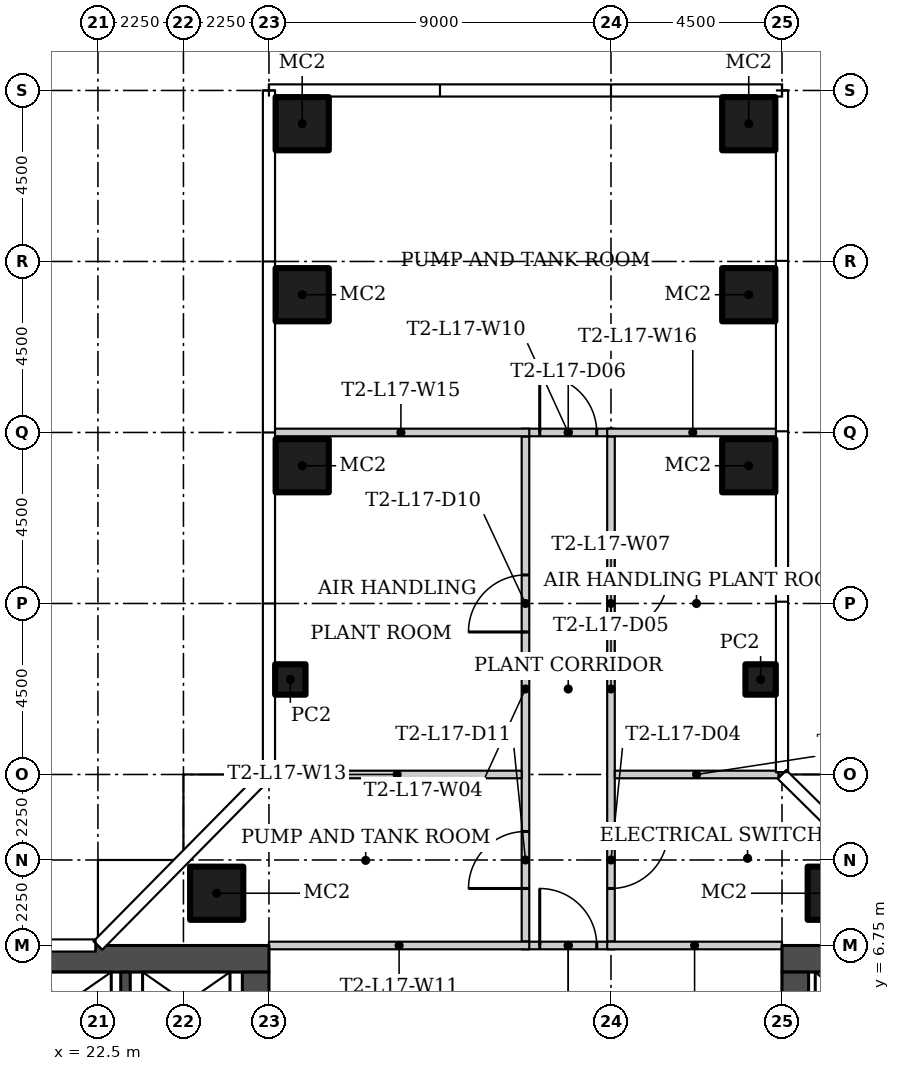
"""IFC4 building model, lengths in metres.
Left out: names, types, materials, properties, quantities, classifications, styles, units other than length and angle.
Written with IfcOpenShell. Run it as: python <this file> out.ifc"""

import sys

from ifc_helpers import new_model, si_unit, direction, frame, frame_2d, origin, origin_2d, place, context, subcontext, project, spatial, rectangle, hollow_rectangle, extrude, element, fill, save


model = new_model("IFC4")
c1 = context("Model", 3, precision=1e-05, world=origin(), true_north=direction((0.0, 1.0)))
c2 = subcontext(c1, "Body", "Model", "MODEL_VIEW")
j1 = project(units=[si_unit("LENGTHUNIT", "METRE"), si_unit("PLANEANGLEUNIT", "RADIAN")], contexts=[c1])
p1 = place(None, origin())
s1 = spatial("IfcSite", under=j1, at=p1, CompositionType="ELEMENT")
p2 = place(p1, origin())
s2 = spatial("IfcBuilding", under=s1, at=p2, CompositionType="ELEMENT")
p3 = place(p2, frame((0.0, 0.0, 77.1)))
s3 = spatial("IfcBuildingStorey", under=s2, at=p3, CompositionType="ELEMENT", Elevation=77.1)
for number, where in (
    (1, (25.625, 8.125, 0.0)),
    (2, (41.875, 8.125, 0.0)),
):
    element("IfcColumn", number, at=place(p3, frame(where)), inside=s3, PredefinedType="COLUMN", context=c2, shape_type="SweptSolid", body=[
        extrude(hollow_rectangle(XDim=1.4, YDim=1.4, WallThickness=0.05, at=origin_2d()), origin(), (0.0, 0.0, 1.0), 4.45),
    ])
p4 = place(p3, frame((39.938, 13.75, 0.0)))
e3 = element("IfcColumn", 3, at=p4, inside=s3, PredefinedType="COLUMN", context=c2, shape_type="SweptSolid", body=[
    extrude(hollow_rectangle(XDim=0.8, YDim=0.8, WallThickness=0.025, at=origin_2d()), origin(), (0.0, 0.0, 1.0), 4.45),
])
for number, where in (
    (4, (39.625, 19.375, 0.0)),
    (5, (39.625, 23.875, 0.0)),
    (6, (39.625, 28.375, 0.0)),
):
    element("IfcColumn", number, at=place(p3, frame(where)), inside=s3, PredefinedType="COLUMN", context=c2, shape_type="SweptSolid", body=[
        extrude(hollow_rectangle(XDim=1.4, YDim=1.4, WallThickness=0.05, at=origin_2d()), origin(), (0.0, 0.0, 1.0), 4.45),
    ])
p5 = place(p3, frame((27.562, 13.75, 0.0)))
e7 = element("IfcColumn", 7, at=p5, inside=s3, PredefinedType="COLUMN", context=c2, shape_type="SweptSolid", body=[
    extrude(hollow_rectangle(XDim=0.8, YDim=0.8, WallThickness=0.025, at=origin_2d()), origin(), (0.0, 0.0, 1.0), 4.45),
])
for number, where in (
    (8, (27.875, 19.375, 0.0)),
    (9, (27.875, 23.875, 0.0)),
    (10, (27.875, 28.375, 0.0)),
):
    element("IfcColumn", number, at=place(p3, frame(where)), inside=s3, PredefinedType="COLUMN", context=c2, shape_type="SweptSolid", body=[
        extrude(hollow_rectangle(XDim=1.4, YDim=1.4, WallThickness=0.05, at=origin_2d()), origin(), (0.0, 0.0, 1.0), 4.45),
    ])
p6 = place(p3, frame((33.75, 6.85, 0.0), z_axis=(0.0, 0.0, 1.0), x_axis=(0.0, 1.0, 0.0)))
e11 = element("IfcWall", 11, at=p6, inside=s3, PredefinedType="PARTITIONING", context=c2, shape_type="SweptSolid", body=[
    extrude(rectangle(XDim=13.3, YDim=0.2, at=frame_2d((6.65, 0.0))), origin(), (0.0, 0.0, 1.0), 4.45),
])
p7 = place(p6, frame((8.15, 0.0, 0.0)))
e12 = element("IfcOpeningElement", 12, at=p7, cuts=e11, PredefinedType="OPENING", context=c2, shape_type="SweptSolid", body=[
    extrude(rectangle(XDim=1.5, YDim=2.4, at=frame_2d((0.75, 1.2))), frame((0.0, 0.11, 0.0), z_axis=(0.0, -1.0, 0.0), x_axis=(1.0, 0.0, 0.0)), (0.0, 0.0, 1.0), 0.22),
])
p8 = place(p6, frame((1.4, 0.0, 0.0)))
e13 = element("IfcOpeningElement", 13, at=p8, cuts=e11, PredefinedType="OPENING", context=c2, shape_type="SweptSolid", body=[
    extrude(rectangle(XDim=1.5, YDim=2.4, at=frame_2d((0.75, 1.2))), frame((0.0, 0.11, 0.0), z_axis=(0.0, -1.0, 0.0), x_axis=(1.0, 0.0, 0.0)), (0.0, 0.0, 1.0), 0.22),
])
p9 = place(p3, frame((36.0, 20.15, 0.0), z_axis=(0.0, 0.0, 1.0), x_axis=(0.0, -1.0, 0.0)))
e14 = element("IfcWall", 14, at=p9, inside=s3, PredefinedType="PARTITIONING", context=c2, shape_type="SweptSolid", body=[
    extrude(rectangle(XDim=13.3, YDim=0.2, at=frame_2d((6.65, 0.0))), origin(), (0.0, 0.0, 1.0), 4.45),
])
p10 = place(p9, frame((10.4, 0.0, 0.0)))
e15 = element("IfcOpeningElement", 15, at=p10, cuts=e14, PredefinedType="OPENING", context=c2, shape_type="SweptSolid", body=[
    extrude(rectangle(XDim=1.5, YDim=2.4, at=frame_2d((0.75, 1.2))), frame((0.0, 0.11, 0.0), z_axis=(0.0, -1.0, 0.0), x_axis=(1.0, 0.0, 0.0)), (0.0, 0.0, 1.0), 0.22),
])
p11 = place(p9, frame((3.65, 0.0, 0.0)))
e16 = element("IfcOpeningElement", 16, at=p11, cuts=e14, PredefinedType="OPENING", context=c2, shape_type="SweptSolid", body=[
    extrude(rectangle(XDim=1.5, YDim=2.4, at=frame_2d((0.75, 1.2))), frame((0.0, 0.11, 0.0), z_axis=(0.0, -1.0, 0.0), x_axis=(1.0, 0.0, 0.0)), (0.0, 0.0, 1.0), 0.22),
])
p12 = place(p3, frame((33.65, 6.75, 0.0)))
e17 = element("IfcWall", 17, at=p12, inside=s3, PredefinedType="PARTITIONING", context=c2, shape_type="SweptSolid", body=[
    extrude(rectangle(XDim=2.45, YDim=0.2, at=frame_2d((1.225, 0.0))), origin(), (0.0, 0.0, 1.0), 4.45),
])
p13 = place(p12, frame((0.475, 0.0, 0.0)))
e18 = element("IfcOpeningElement", 18, at=p13, cuts=e17, PredefinedType="OPENING", context=c2, shape_type="SweptSolid", body=[
    extrude(rectangle(XDim=1.5, YDim=2.4, at=frame_2d((0.75, 1.2))), frame((0.0, 0.11, 0.0), z_axis=(0.0, -1.0, 0.0), x_axis=(1.0, 0.0, 0.0)), (0.0, 0.0, 1.0), 0.22),
])
p14 = place(p3, frame((33.65, 20.25, 0.0)))
e19 = element("IfcWall", 19, at=p14, inside=s3, PredefinedType="PARTITIONING", context=c2, shape_type="SweptSolid", body=[
    extrude(rectangle(XDim=2.45, YDim=0.2, at=frame_2d((1.225, 0.0))), origin(), (0.0, 0.0, 1.0), 4.45),
])
p15 = place(p14, frame((0.475, 0.0, 0.0)))
e20 = element("IfcOpeningElement", 20, at=p15, cuts=e19, PredefinedType="OPENING", context=c2, shape_type="SweptSolid", body=[
    extrude(rectangle(XDim=1.5, YDim=2.4, at=frame_2d((0.75, 1.2))), frame((0.0, 0.11, 0.0), z_axis=(0.0, -1.0, 0.0), x_axis=(1.0, 0.0, 0.0)), (0.0, 0.0, 1.0), 0.22),
])
p16 = place(p3, frame((33.85, 6.75, 0.0), z_axis=(0.0, 0.0, 1.0), x_axis=(-1.0, 0.0, 0.0)))
e21 = element("IfcWall", 21, at=p16, inside=s3, PredefinedType="PARTITIONING", context=c2, shape_type="SweptSolid", body=[
    extrude(rectangle(XDim=6.85, YDim=0.2, at=frame_2d((3.425, 0.0))), origin(), (0.0, 0.0, 1.0), 4.45),
])
p17 = place(p3, frame((40.5, 6.75, 0.0), z_axis=(0.0, 0.0, 1.0), x_axis=(-1.0, 0.0, 0.0)))
e22 = element("IfcWall", 22, at=p17, inside=s3, PredefinedType="PARTITIONING", context=c2, shape_type="SweptSolid", body=[
    extrude(rectangle(XDim=4.6, YDim=0.2, at=frame_2d((2.3, 0.0))), origin(), (0.0, 0.0, 1.0), 4.45),
])
p18 = place(p3, frame((33.65, 11.25, 0.0), z_axis=(0.0, 0.0, 1.0), x_axis=(-1.0, 0.0, 0.0)))
e23 = element("IfcWall", 23, at=p18, inside=s3, PredefinedType="PARTITIONING", context=c2, shape_type="SweptSolid", body=[
    extrude(rectangle(XDim=6.555, YDim=0.2, at=frame_2d((3.277, 0.0))), origin(), (0.0, 0.0, 1.0), 4.45),
])
p19 = place(p3, frame((40.405, 11.25, 0.0), z_axis=(0.0, 0.0, 1.0), x_axis=(-1.0, 0.0, 0.0)))
e24 = element("IfcWall", 24, at=p19, inside=s3, PredefinedType="PARTITIONING", context=c2, shape_type="SweptSolid", body=[
    extrude(rectangle(XDim=4.305, YDim=0.2, at=frame_2d((2.152, 0.0))), origin(), (0.0, 0.0, 1.0), 4.45),
])
p20 = place(p3, frame((33.85, 20.25, 0.0), z_axis=(0.0, 0.0, 1.0), x_axis=(-1.0, 0.0, 0.0)))
e25 = element("IfcWall", 25, at=p20, inside=s3, PredefinedType="PARTITIONING", context=c2, shape_type="SweptSolid", body=[
    extrude(rectangle(XDim=6.755, YDim=0.2, at=frame_2d((3.377, 0.0))), origin(), (0.0, 0.0, 1.0), 4.45),
])
p21 = place(p3, frame((40.405, 20.25, 0.0), z_axis=(0.0, 0.0, 1.0), x_axis=(-1.0, 0.0, 0.0)))
e26 = element("IfcWall", 26, at=p21, inside=s3, PredefinedType="PARTITIONING", context=c2, shape_type="SweptSolid", body=[
    extrude(rectangle(XDim=4.505, YDim=0.2, at=frame_2d((2.252, 0.0))), origin(), (0.0, 0.0, 1.0), 4.45),
])
p22 = place(p3, frame((13.5, 6.4, 0.0)))
e27 = element("IfcWall", 27, at=p22, inside=s3, PredefinedType="SHEAR", context=c2, shape_type="SweptSolid", body=[
    extrude(rectangle(XDim=13.5, YDim=0.7, at=frame_2d((6.75, 0.0))), origin(), (0.0, 0.0, 1.0), 4.45),
])
p23 = place(p3, frame((26.65, 6.05, 0.0), z_axis=(0.0, 0.0, 1.0), x_axis=(0.0, -1.0, 0.0)))
e28 = element("IfcWall", 28, at=p23, inside=s3, PredefinedType="SHEAR", context=c2, shape_type="SweptSolid", body=[
    extrude(rectangle(XDim=12.1, YDim=0.7, at=frame_2d((6.05, 0.0))), origin(), (0.0, 0.0, 1.0), 4.45),
])
p24 = place(p23, frame((10.1, 0.0, 0.0)))
e29 = element("IfcOpeningElement", 29, at=p24, cuts=e28, PredefinedType="OPENING", context=c2, shape_type="SweptSolid", body=[
    extrude(rectangle(XDim=1.2, YDim=2.1, at=frame_2d((0.6, 1.05))), frame((0.0, 0.36, 0.0), z_axis=(0.0, -1.0, 0.0), x_axis=(1.0, 0.0, 0.0)), (0.0, 0.0, 1.0), 0.72),
])
p25 = place(p23, frame((3.9, 0.0, 0.0)))
e30 = element("IfcOpeningElement", 30, at=p25, cuts=e28, PredefinedType="OPENING", context=c2, shape_type="SweptSolid", body=[
    extrude(rectangle(XDim=1.8, YDim=2.4, at=frame_2d((0.9, 1.2))), frame((0.0, 0.36, 0.0), z_axis=(0.0, -1.0, 0.0), x_axis=(1.0, 0.0, 0.0)), (0.0, 0.0, 1.0), 0.72),
])
p26 = place(p3, frame((23.225, 3.25, 0.0), z_axis=(0.0, 0.0, 1.0), x_axis=(0.0, 1.0, 0.0)))
e31 = element("IfcWall", 31, at=p26, inside=s3, PredefinedType="SHEAR", context=c2, shape_type="SweptSolid", body=[
    extrude(rectangle(XDim=2.8, YDim=0.25, at=frame_2d((1.4, 0.0))), origin(), (0.0, 0.0, 1.0), 4.45),
])
p27 = place(p3, frame((54.0, 6.4, 0.0), z_axis=(0.0, 0.0, 1.0), x_axis=(-1.0, 0.0, 0.0)))
e32 = element("IfcWall", 32, at=p27, inside=s3, PredefinedType="SHEAR", context=c2, shape_type="SweptSolid", body=[
    extrude(rectangle(XDim=13.5, YDim=0.7, at=frame_2d((6.75, 0.0))), origin(), (0.0, 0.0, 1.0), 4.45),
])
p28 = place(p3, frame((40.85, -6.05, 0.0), z_axis=(0.0, 0.0, 1.0), x_axis=(0.0, 1.0, 0.0)))
e33 = element("IfcWall", 33, at=p28, inside=s3, PredefinedType="SHEAR", context=c2, shape_type="SweptSolid", body=[
    extrude(rectangle(XDim=12.1, YDim=0.7, at=frame_2d((6.05, 0.0))), origin(), (0.0, 0.0, 1.0), 4.45),
])
p29 = place(p28, frame((0.8, 0.0, 0.0)))
e34 = element("IfcOpeningElement", 34, at=p29, cuts=e33, PredefinedType="OPENING", context=c2, shape_type="SweptSolid", body=[
    extrude(rectangle(XDim=1.2, YDim=2.1, at=frame_2d((0.6, 1.05))), frame((0.0, 0.36, 0.0), z_axis=(0.0, -1.0, 0.0), x_axis=(1.0, 0.0, 0.0)), (0.0, 0.0, 1.0), 0.72),
])
p30 = place(p28, frame((6.4, 0.0, 0.0)))
e35 = element("IfcOpeningElement", 35, at=p30, cuts=e33, PredefinedType="OPENING", context=c2, shape_type="SweptSolid", body=[
    extrude(rectangle(XDim=1.8, YDim=2.4, at=frame_2d((0.9, 1.2))), frame((0.0, 0.36, 0.0), z_axis=(0.0, -1.0, 0.0), x_axis=(1.0, 0.0, 0.0)), (0.0, 0.0, 1.0), 0.72),
])
p31 = place(p13, origin())
e36 = element("IfcDoor", 36, at=p31, inside=s3, OperationType="DOUBLE_DOOR_SINGLE_SWING", PredefinedType="DOOR", context=c2, shape_type="SweptSolid", body=[
    extrude(rectangle(XDim=1.5, YDim=2.4, at=frame_2d((0.75, 1.2))), frame((0.0, 0.025, 0.0), z_axis=(0.0, -1.0, 0.0), x_axis=(1.0, 0.0, 0.0)), (0.0, 0.0, 1.0), 0.05),
])
fill(e18, e36)
p32 = place(p10, origin())
e37 = element("IfcDoor", 37, at=p32, inside=s3, OperationType="DOUBLE_DOOR_SINGLE_SWING", PredefinedType="DOOR", context=c2, shape_type="SweptSolid", body=[
    extrude(rectangle(XDim=1.5, YDim=2.4, at=frame_2d((0.75, 1.2))), frame((0.0, 0.025, 0.0), z_axis=(0.0, -1.0, 0.0), x_axis=(1.0, 0.0, 0.0)), (0.0, 0.0, 1.0), 0.05),
])
fill(e15, e37)
p33 = place(p11, origin())
e38 = element("IfcDoor", 38, at=p33, inside=s3, OperationType="DOUBLE_DOOR_SINGLE_SWING", PredefinedType="DOOR", context=c2, shape_type="SweptSolid", body=[
    extrude(rectangle(XDim=1.5, YDim=2.4, at=frame_2d((0.75, 1.2))), frame((0.0, 0.025, 0.0), z_axis=(0.0, -1.0, 0.0), x_axis=(1.0, 0.0, 0.0)), (0.0, 0.0, 1.0), 0.05),
])
fill(e16, e38)
p34 = place(p15, origin())
e39 = element("IfcDoor", 39, at=p34, inside=s3, OperationType="DOUBLE_DOOR_SINGLE_SWING", PredefinedType="DOOR", context=c2, shape_type="SweptSolid", body=[
    extrude(rectangle(XDim=1.5, YDim=2.4, at=frame_2d((0.75, 1.2))), frame((0.0, 0.025, 0.0), z_axis=(0.0, -1.0, 0.0), x_axis=(1.0, 0.0, 0.0)), (0.0, 0.0, 1.0), 0.05),
])
fill(e20, e39)
p35 = place(p7, origin())
e40 = element("IfcDoor", 40, at=p35, inside=s3, OperationType="DOUBLE_DOOR_SINGLE_SWING", PredefinedType="DOOR", context=c2, shape_type="SweptSolid", body=[
    extrude(rectangle(XDim=1.5, YDim=2.4, at=frame_2d((0.75, 1.2))), frame((0.0, 0.025, 0.0), z_axis=(0.0, -1.0, 0.0), x_axis=(1.0, 0.0, 0.0)), (0.0, 0.0, 1.0), 0.05),
])
fill(e12, e40)
p36 = place(p8, origin())
e41 = element("IfcDoor", 41, at=p36, inside=s3, OperationType="DOUBLE_DOOR_SINGLE_SWING", PredefinedType="DOOR", context=c2, shape_type="SweptSolid", body=[
    extrude(rectangle(XDim=1.5, YDim=2.4, at=frame_2d((0.75, 1.2))), frame((0.0, 0.025, 0.0), z_axis=(0.0, -1.0, 0.0), x_axis=(1.0, 0.0, 0.0)), (0.0, 0.0, 1.0), 0.05),
])
fill(e13, e41)
save(model, sys.argv[1])
